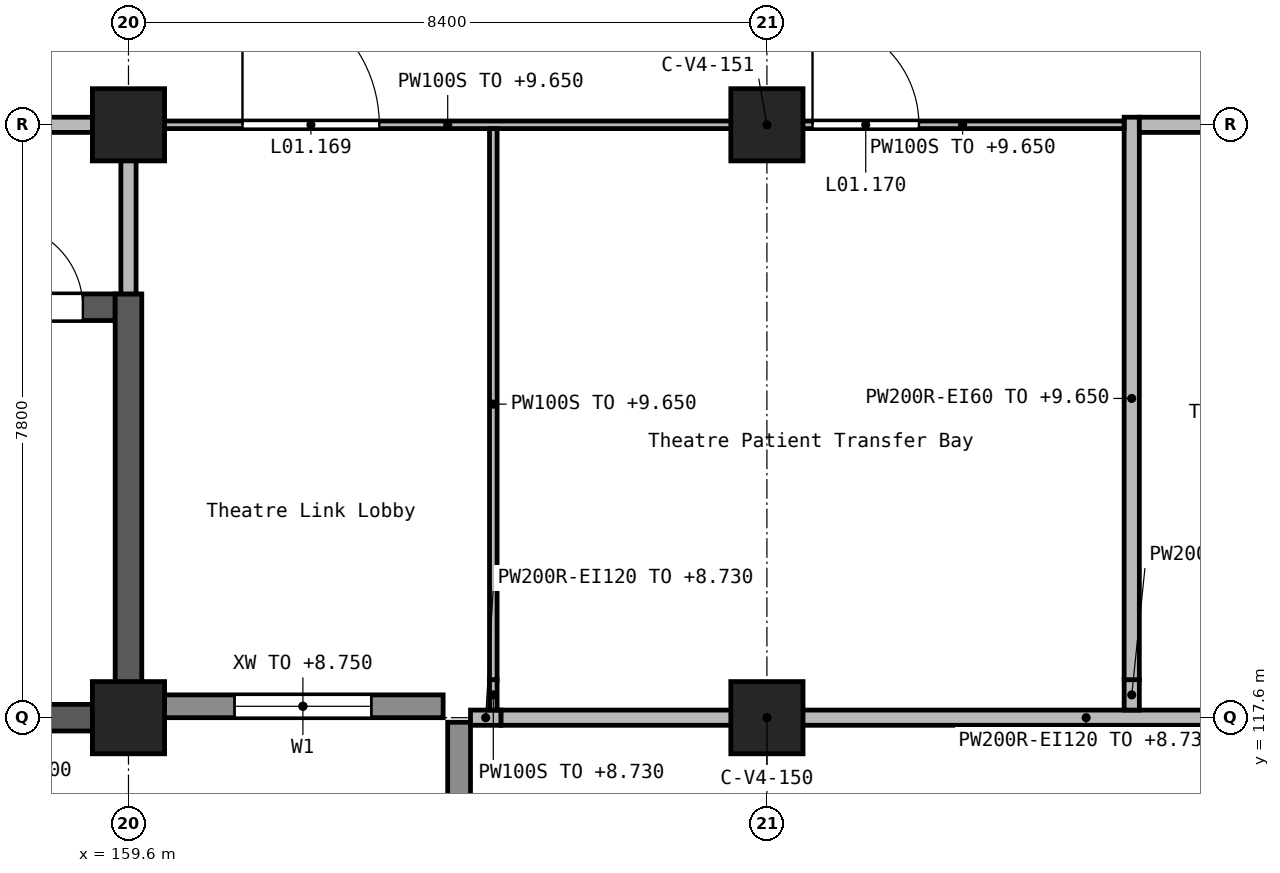
"""IFC4 building model, lengths in metres.
Left out: names, types, materials, properties, quantities, classifications, styles, units other than length and angle.
Written with IfcOpenShell. Run it as: python <this file> out.ifc"""

import sys

from ifc_helpers import new_model, si_unit, direction, frame, frame_2d, origin, origin_2d, place, context, subcontext, project, spatial, rectangle, extrude, element, fill, save


model = new_model("IFC4")
c1 = context("Model", 3, precision=1e-05, world=origin(), true_north=direction((0.0, 1.0)))
c2 = subcontext(c1, "Body", "Model", "MODEL_VIEW")
j1 = project(units=[si_unit("LENGTHUNIT", "METRE"), si_unit("PLANEANGLEUNIT", "RADIAN")], contexts=[c1])
p1 = place(None, origin())
s1 = spatial("IfcSite", under=j1, at=p1, CompositionType="ELEMENT")
p2 = place(p1, origin())
s2 = spatial("IfcBuilding", under=s1, at=p2, CompositionType="ELEMENT")
p3 = place(p2, frame((0.0, 0.0, 5.4)))
s3 = spatial("IfcBuildingStorey", under=s2, at=p3, CompositionType="ELEMENT", Elevation=5.4)
for number, where, z_axis, x_axis in (
    (1, (159.6, 117.6, 0.0), (0.0, 0.0, 1.0), (1.0, 0.0, 0.0)),
    (2, (159.6, 125.4, 0.0), (0.0, 0.0, 1.0), (1.0, 0.0, 0.0)),
    (3, (168.0, 117.6, 0.0), (0.0, 0.0, 1.0), (1.0, 0.0, 0.0)),
    (4, (168.0, 125.4, 0.0), (0.0, 0.0, 1.0), (1.0, 0.0, 0.0)),
):
    element("IfcColumn", number, at=place(p3, frame(where, z_axis=z_axis, x_axis=x_axis)), inside=s3, PredefinedType="COLUMN", context=c2, shape_type="SweptSolid", body=[
        extrude(rectangle(XDim=0.95, YDim=0.95, at=origin_2d()), origin(), (0.0, 0.0, 1.0), 4.5),
    ])
p4 = place(p3, frame((151.025, 123.0, 0.0), z_axis=(0.0, 0.0, 1.0), x_axis=(1.0, 0.0, 0.0)))
e5 = element("IfcWall", 5, at=p4, inside=s3, PredefinedType="SHEAR", context=c2, shape_type="SweptSolid", body=[
    extrude(rectangle(XDim=8.4, YDim=0.35, at=frame_2d((4.2, 0.0))), origin(), (0.0, 0.0, 1.0), 4.5),
])
p5 = place(p4, frame((6.875, 0.0, 0.0)))
e6 = element("IfcOpeningElement", 6, at=p5, cuts=e5, PredefinedType="OPENING", context=c2, shape_type="SweptSolid", body=[
    extrude(rectangle(XDim=1.1, YDim=2.1, at=frame_2d((0.55, 1.05))), frame((0.0, 0.185, 0.0), z_axis=(0.0, -1.0, 0.0), x_axis=(1.0, 0.0, 0.0)), (0.0, 0.0, 1.0), 0.37),
])
p6 = place(p3, frame((151.375, 117.6, 0.0), z_axis=(0.0, 0.0, 1.0), x_axis=(1.0, 0.0, 0.0)))
e7 = element("IfcWall", 7, at=p6, inside=s3, PredefinedType="SHEAR", context=c2, shape_type="SweptSolid", body=[
    extrude(rectangle(XDim=8.05, YDim=0.35, at=frame_2d((4.025, 0.0))), origin(), (0.0, 0.0, 1.0), 4.5),
])
p7 = place(p3, frame((159.6, 117.425, 0.0), z_axis=(0.0, 0.0, 1.0), x_axis=(0.0, 1.0, 0.0)))
e8 = element("IfcWall", 8, at=p7, inside=s3, PredefinedType="SHEAR", context=c2, shape_type="SweptSolid", body=[
    extrude(rectangle(XDim=5.75, YDim=0.35, at=frame_2d((2.875, 0.0))), origin(), (0.0, 0.0, 1.0), 4.5),
])
p8 = place(p3, frame((163.95, 117.54, 0.0), z_axis=(0.0, 0.0, 1.0), x_axis=(0.0, -1.0, 0.0)))
e9 = element("IfcWall", 9, at=p8, inside=s3, PredefinedType="STANDARD", context=c2, shape_type="SweptSolid", body=[
    extrude(rectangle(XDim=7.94, YDim=0.3, at=frame_2d((3.97, 0.0))), origin(), (0.0, 0.0, 1.0), 3.35),
])
p9 = place(p8, frame((1.385, 0.0, 1.2)))
e10 = element("IfcOpeningElement", 10, at=p9, cuts=e9, PredefinedType="OPENING", context=c2, shape_type="SweptSolid", body=[
    extrude(rectangle(XDim=1.2, YDim=1.2, at=frame_2d((0.6, 0.6))), frame((0.0, 0.16, 0.0), z_axis=(0.0, -1.0, 0.0), x_axis=(1.0, 0.0, 0.0)), (0.0, 0.0, 1.0), 0.32),
])
p10 = place(p8, frame((5.355, 0.0, 1.2)))
e11 = element("IfcOpeningElement", 11, at=p10, cuts=e9, PredefinedType="OPENING", context=c2, shape_type="SweptSolid", body=[
    extrude(rectangle(XDim=1.2, YDim=1.2, at=frame_2d((0.6, 0.6))), frame((0.0, 0.16, 0.0), z_axis=(0.0, -1.0, 0.0), x_axis=(1.0, 0.0, 0.0)), (0.0, 0.0, 1.0), 0.32),
])
p11 = place(p3, frame((160.05, 117.75, 0.0), z_axis=(0.0, 0.0, 1.0), x_axis=(1.0, 0.0, 0.0)))
e12 = element("IfcWall", 12, at=p11, inside=s3, PredefinedType="STANDARD", context=c2, shape_type="SweptSolid", body=[
    extrude(rectangle(XDim=3.69, YDim=0.3, at=frame_2d((1.845, 0.0))), origin(), (0.0, 0.0, 1.0), 3.35),
])
p12 = place(p11, frame((0.945, 0.0, 0.9)))
e13 = element("IfcOpeningElement", 13, at=p12, cuts=e12, PredefinedType="OPENING", context=c2, shape_type="SweptSolid", body=[
    extrude(rectangle(XDim=1.8, YDim=1.5, at=frame_2d((0.9, 0.75))), frame((0.0, 0.16, 0.0), z_axis=(0.0, -1.0, 0.0), x_axis=(1.0, 0.0, 0.0)), (0.0, 0.0, 1.0), 0.32),
])
p13 = place(p3, frame((175.95, 117.6, 0.0), z_axis=(0.0, 0.0, 1.0), x_axis=(-1.0, 0.0, 0.0)))
e14 = element("IfcWall", 14, at=p13, inside=s3, PredefinedType="SOLIDWALL", context=c2, shape_type="SweptSolid", body=[
    extrude(rectangle(XDim=7.5, YDim=0.2, at=frame_2d((3.75, 0.0))), origin(), (0.0, 0.0, 1.0), 3.33),
])
p14 = place(p3, frame((167.55, 117.6, 0.0), z_axis=(0.0, 0.0, 1.0), x_axis=(-1.0, 0.0, 0.0)))
e15 = element("IfcWall", 15, at=p14, inside=s3, PredefinedType="SOLIDWALL", context=c2, shape_type="SweptSolid", body=[
    extrude(rectangle(XDim=3.05, YDim=0.2, at=frame_2d((1.525, 0.0))), origin(), (0.0, 0.0, 1.0), 3.33),
])
p15 = place(p3, frame((164.5, 117.6, 0.0), z_axis=(0.0, 0.0, 1.0), x_axis=(-1.0, 0.0, 0.0)))
e16 = element("IfcWall", 16, at=p15, inside=s3, PredefinedType="SOLIDWALL", context=c2, shape_type="SweptSolid", body=[
    extrude(rectangle(XDim=0.4, YDim=0.2, at=frame_2d((0.2, 0.0))), origin(), (0.0, 0.0, 1.0), 3.33),
])
p16 = place(p3, frame((151.65, 125.4, 0.0), z_axis=(0.0, 0.0, 1.0), x_axis=(1.0, 0.0, 0.0)))
e17 = element("IfcWall", 17, at=p16, inside=s3, PredefinedType="SOLIDWALL", context=c2, shape_type="SweptSolid", body=[
    extrude(rectangle(XDim=7.5, YDim=0.2, at=frame_2d((3.75, 0.0))), origin(), (0.0, 0.0, 1.0), 4.25),
])
p17 = place(p16, frame((3.2, 0.0, 0.0)))
e18 = element("IfcOpeningElement", 18, at=p17, cuts=e17, PredefinedType="OPENING", context=c2, shape_type="SweptSolid", body=[
    extrude(rectangle(XDim=1.1, YDim=2.1, at=frame_2d((0.55, 1.05))), frame((0.0, 0.11, 0.0), z_axis=(0.0, -1.0, 0.0), x_axis=(1.0, 0.0, 0.0)), (0.0, 0.0, 1.0), 0.22),
])
p18 = place(p3, frame((172.8, 117.7, 0.0), z_axis=(0.0, 0.0, 1.0), x_axis=(0.0, 1.0, 0.0)))
e19 = element("IfcWall", 19, at=p18, inside=s3, PredefinedType="SOLIDWALL", context=c2, shape_type="SweptSolid", body=[
    extrude(rectangle(XDim=0.4, YDim=0.2, at=frame_2d((0.2, 0.0))), origin(), (0.0, 0.0, 1.0), 3.33),
])
p19 = place(p3, frame((172.8, 118.1, 0.0), z_axis=(0.0, 0.0, 1.0), x_axis=(0.0, 1.0, 0.0)))
e20 = element("IfcWall", 20, at=p19, inside=s3, PredefinedType="SOLIDWALL", context=c2, shape_type="SweptSolid", body=[
    extrude(rectangle(XDim=7.4, YDim=0.2, at=frame_2d((3.7, 0.0))), origin(), (0.0, 0.0, 1.0), 4.25),
])
p20 = place(p3, frame((172.9, 125.4, 0.0), z_axis=(0.0, 0.0, 1.0), x_axis=(1.0, 0.0, 0.0)))
e21 = element("IfcWall", 21, at=p20, inside=s3, PredefinedType="SOLIDWALL", context=c2, shape_type="SweptSolid", body=[
    extrude(rectangle(XDim=3.05, YDim=0.2, at=frame_2d((1.525, 0.0))), origin(), (0.0, 0.0, 1.0), 4.25),
])
p21 = place(p20, frame((1.2, 0.0, 0.0)))
e22 = element("IfcOpeningElement", 22, at=p21, cuts=e21, PredefinedType="OPENING", context=c2, shape_type="SweptSolid", body=[
    extrude(rectangle(XDim=1.0, YDim=2.1, at=frame_2d((0.5, 1.05))), frame((0.0, 0.11, 0.0), z_axis=(0.0, -1.0, 0.0), x_axis=(1.0, 0.0, 0.0)), (0.0, 0.0, 1.0), 0.22),
])
p22 = place(p3, frame((159.6, 123.175, 0.0), z_axis=(0.0, 0.0, 1.0), x_axis=(0.0, 1.0, 0.0)))
e23 = element("IfcWall", 23, at=p22, inside=s3, PredefinedType="SOLIDWALL", context=c2, shape_type="SweptSolid", body=[
    extrude(rectangle(XDim=1.775, YDim=0.2, at=frame_2d((0.887, 0.0))), origin(), (0.0, 0.0, 1.0), 4.25),
])
p23 = place(p3, frame((160.05, 125.4, 0.0), z_axis=(0.0, 0.0, 1.0), x_axis=(1.0, 0.0, 0.0)))
e24 = element("IfcWall", 24, at=p23, inside=s3, PredefinedType="PARTITIONING", context=c2, shape_type="SweptSolid", body=[
    extrude(rectangle(XDim=7.5, YDim=0.1, at=frame_2d((3.75, 0.0))), origin(), (0.0, 0.0, 1.0), 4.25),
])
p24 = place(p23, frame((1.05, 0.0, 0.0)))
e25 = element("IfcOpeningElement", 25, at=p24, cuts=e24, PredefinedType="OPENING", context=c2, shape_type="SweptSolid", body=[
    extrude(rectangle(XDim=1.8, YDim=2.1, at=frame_2d((0.9, 1.05))), frame((0.0, 0.06, 0.0), z_axis=(0.0, -1.0, 0.0), x_axis=(1.0, 0.0, 0.0)), (0.0, 0.0, 1.0), 0.12),
])
p25 = place(p3, frame((168.45, 125.4, 0.0), z_axis=(0.0, 0.0, 1.0), x_axis=(1.0, 0.0, 0.0)))
e26 = element("IfcWall", 26, at=p25, inside=s3, PredefinedType="PARTITIONING", context=c2, shape_type="SweptSolid", body=[
    extrude(rectangle(XDim=4.25, YDim=0.1, at=frame_2d((2.125, 0.0))), origin(), (0.0, 0.0, 1.0), 4.25),
])
p26 = place(p25, frame((0.15, 0.0, 0.0)))
e27 = element("IfcOpeningElement", 27, at=p26, cuts=e26, PredefinedType="OPENING", context=c2, shape_type="SweptSolid", body=[
    extrude(rectangle(XDim=1.4, YDim=2.1, at=frame_2d((0.7, 1.05))), frame((0.0, 0.06, 0.0), z_axis=(0.0, -1.0, 0.0), x_axis=(1.0, 0.0, 0.0)), (0.0, 0.0, 1.0), 0.12),
])
p27 = place(p3, frame((164.4, 117.7, 0.0), z_axis=(0.0, 0.0, 1.0), x_axis=(0.0, 1.0, 0.0)))
e28 = element("IfcWall", 28, at=p27, inside=s3, PredefinedType="PARTITIONING", context=c2, shape_type="SweptSolid", body=[
    extrude(rectangle(XDim=0.4, YDim=0.1, at=frame_2d((0.2, 0.0))), origin(), (0.0, 0.0, 1.0), 3.33),
])
p28 = place(p3, frame((164.4, 118.1, 0.0), z_axis=(0.0, 0.0, 1.0), x_axis=(0.0, 1.0, 0.0)))
e29 = element("IfcWall", 29, at=p28, inside=s3, PredefinedType="PARTITIONING", context=c2, shape_type="SweptSolid", body=[
    extrude(rectangle(XDim=7.25, YDim=0.1, at=frame_2d((3.625, 0.0))), origin(), (0.0, 0.0, 1.0), 4.25),
])
p29 = place(p12, origin())
e30 = element("IfcWindow", 30, at=p29, inside=s3, PartitioningType="SINGLE_PANEL", PredefinedType="WINDOW", context=c2, shape_type="SweptSolid", body=[
    extrude(rectangle(XDim=1.8, YDim=1.5, at=frame_2d((0.9, 0.75))), frame((0.0, 0.03, 0.0), z_axis=(0.0, -1.0, 0.0), x_axis=(1.0, 0.0, 0.0)), (0.0, 0.0, 1.0), 0.06),
])
fill(e13, e30)
p30 = place(p5, frame((1.1, 0.0, 0.0), z_axis=(0.0, 0.0, 1.0), x_axis=(-1.0, 0.0, 0.0)))
e31 = element("IfcDoor", 31, at=p30, inside=s3, OperationType="SINGLE_SWING_LEFT", PredefinedType="DOOR", context=c2, shape_type="SweptSolid", body=[
    extrude(rectangle(XDim=1.1, YDim=2.1, at=frame_2d((0.55, 1.05))), frame((0.0, 0.025, 0.0), z_axis=(0.0, -1.0, 0.0), x_axis=(1.0, 0.0, 0.0)), (0.0, 0.0, 1.0), 0.05),
])
fill(e6, e31)
p31 = place(p24, frame((1.8, 0.0, 0.0), z_axis=(0.0, 0.0, 1.0), x_axis=(-1.0, 0.0, 0.0)))
e32 = element("IfcDoor", 32, at=p31, inside=s3, OperationType="DOUBLE_DOOR_SINGLE_SWING", PredefinedType="DOOR", context=c2, shape_type="SweptSolid", body=[
    extrude(rectangle(XDim=1.8, YDim=2.1, at=frame_2d((0.9, 1.05))), frame((0.0, 0.025, 0.0), z_axis=(0.0, -1.0, 0.0), x_axis=(1.0, 0.0, 0.0)), (0.0, 0.0, 1.0), 0.05),
])
fill(e25, e32)
p32 = place(p26, frame((1.4, 0.0, 0.0), z_axis=(0.0, 0.0, 1.0), x_axis=(-1.0, 0.0, 0.0)))
e33 = element("IfcDoor", 33, at=p32, inside=s3, OperationType="DOUBLE_DOOR_SINGLE_SWING", PredefinedType="DOOR", context=c2, shape_type="SweptSolid", body=[
    extrude(rectangle(XDim=1.4, YDim=2.1, at=frame_2d((0.7, 1.05))), frame((0.0, 0.025, 0.0), z_axis=(0.0, -1.0, 0.0), x_axis=(1.0, 0.0, 0.0)), (0.0, 0.0, 1.0), 0.05),
])
fill(e27, e33)
save(model, sys.argv[1])
